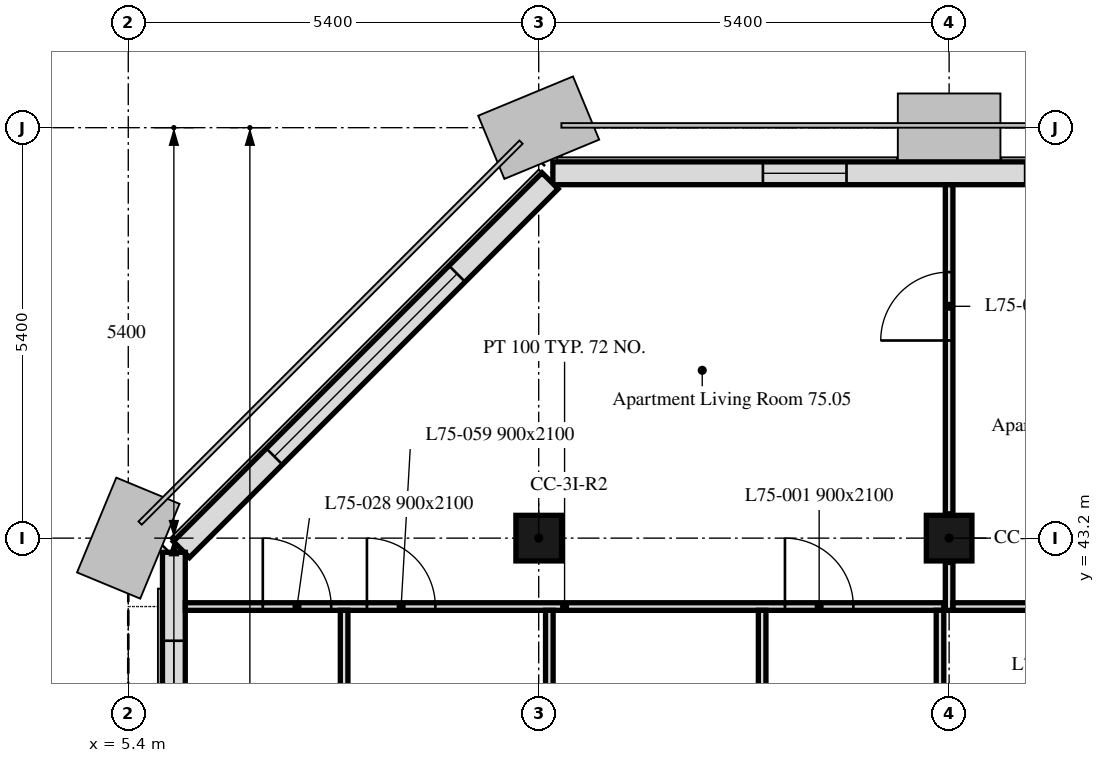
"""IFC4 building model, lengths in metres.
Left out: names, types, materials, properties, quantities, classifications, styles, units other than length and angle.
Written with IfcOpenShell. Run it as: python <this file> out.ifc"""

import sys

from ifc_helpers import new_model, si_unit, direction, frame, frame_2d, origin, origin_2d, place, context, subcontext, project, spatial, rectangle, extrude, element, fill, save


model = new_model("IFC4")
c1 = context("Model", 3, precision=1e-05, world=origin(), true_north=direction((0.0, 1.0)))
c2 = subcontext(c1, "Body", "Model", "MODEL_VIEW")
j1 = project(units=[si_unit("LENGTHUNIT", "METRE"), si_unit("PLANEANGLEUNIT", "RADIAN")], contexts=[c1])
p1 = place(None, origin())
s1 = spatial("IfcSite", under=j1, at=p1, CompositionType="ELEMENT")
p2 = place(p1, origin())
s2 = spatial("IfcBuilding", under=s1, at=p2, CompositionType="ELEMENT")
p3 = place(p2, frame((0.0, 0.0, 301.6)))
s3 = spatial("IfcBuildingStorey", under=s2, at=p3, CompositionType="ELEMENT", Elevation=301.6)
for number, where, z_axis, x_axis in (
    (1, (10.8, 43.2, 0.0), (0.0, 0.0, 1.0), (1.0, 0.0, 0.0)),
    (2, (16.2, 43.2, 0.0), (0.0, 0.0, 1.0), (1.0, 0.0, 0.0)),
):
    element("IfcColumn", number, at=place(p3, frame(where, z_axis=z_axis, x_axis=x_axis)), inside=s3, PredefinedType="COLUMN", context=c2, shape_type="SweptSolid", body=[
        extrude(rectangle(XDim=0.6, YDim=0.6, at=origin_2d()), origin(), (0.0, 0.0, 1.0), 3.0),
    ])
p4 = place(p3, frame((43.014, 48.0, 0.0), z_axis=(0.0, 0.0, 1.0), x_axis=(-1.0, 0.0, 0.0)))
e3 = element("IfcWall", 3, at=p4, inside=s3, PredefinedType="SOLIDWALL", context=c2, shape_type="SweptSolid", body=[
    extrude(rectangle(XDim=32.027, YDim=0.3, at=frame_2d((16.014, 0.0))), origin(), (0.0, 0.0, 1.0), 3.0),
])
p5 = place(p4, frame((0.814, 0.0, 0.9)))
e4 = element("IfcOpeningElement", 4, at=p5, cuts=e3, PredefinedType="OPENING", context=c2, shape_type="SweptSolid", body=[
    extrude(rectangle(XDim=3.4, YDim=1.7, at=frame_2d((1.7, 0.85))), frame((0.0, 0.16, 0.0), z_axis=(0.0, -1.0, 0.0), x_axis=(1.0, 0.0, 0.0)), (0.0, 0.0, 1.0), 0.32),
])
p6 = place(p4, frame((6.564, 0.0, 0.9)))
e5 = element("IfcOpeningElement", 5, at=p6, cuts=e3, PredefinedType="OPENING", context=c2, shape_type="SweptSolid", body=[
    extrude(rectangle(XDim=1.1, YDim=1.7, at=frame_2d((0.55, 0.85))), frame((0.0, 0.16, 0.0), z_axis=(0.0, -1.0, 0.0), x_axis=(1.0, 0.0, 0.0)), (0.0, 0.0, 1.0), 0.32),
])
p7 = place(p4, frame((11.614, 0.0, 0.9)))
e6 = element("IfcOpeningElement", 6, at=p7, cuts=e3, PredefinedType="OPENING", context=c2, shape_type="SweptSolid", body=[
    extrude(rectangle(XDim=3.4, YDim=1.7, at=frame_2d((1.7, 0.85))), frame((0.0, 0.16, 0.0), z_axis=(0.0, -1.0, 0.0), x_axis=(1.0, 0.0, 0.0)), (0.0, 0.0, 1.0), 0.32),
])
p8 = place(p4, frame((17.364, 0.0, 0.9)))
e7 = element("IfcOpeningElement", 7, at=p8, cuts=e3, PredefinedType="OPENING", context=c2, shape_type="SweptSolid", body=[
    extrude(rectangle(XDim=1.1, YDim=1.7, at=frame_2d((0.55, 0.85))), frame((0.0, 0.16, 0.0), z_axis=(0.0, -1.0, 0.0), x_axis=(1.0, 0.0, 0.0)), (0.0, 0.0, 1.0), 0.32),
])
p9 = place(p4, frame((22.414, 0.0, 0.9)))
e8 = element("IfcOpeningElement", 8, at=p9, cuts=e3, PredefinedType="OPENING", context=c2, shape_type="SweptSolid", body=[
    extrude(rectangle(XDim=3.4, YDim=1.7, at=frame_2d((1.7, 0.85))), frame((0.0, 0.16, 0.0), z_axis=(0.0, -1.0, 0.0), x_axis=(1.0, 0.0, 0.0)), (0.0, 0.0, 1.0), 0.32),
])
p10 = place(p4, frame((28.164, 0.0, 0.9)))
e9 = element("IfcOpeningElement", 9, at=p10, cuts=e3, PredefinedType="OPENING", context=c2, shape_type="SweptSolid", body=[
    extrude(rectangle(XDim=1.1, YDim=1.7, at=frame_2d((0.55, 0.85))), frame((0.0, 0.16, 0.0), z_axis=(0.0, -1.0, 0.0), x_axis=(1.0, 0.0, 0.0)), (0.0, 0.0, 1.0), 0.32),
])
p11 = place(p3, frame((10.949, 47.901, 0.0), z_axis=(0.0, 0.0, 1.0), x_axis=(-0.707106781187, -0.707106781187, 0.0)))
e10 = element("IfcWall", 10, at=p11, inside=s3, PredefinedType="SOLIDWALL", context=c2, shape_type="SweptSolid", body=[
    extrude(rectangle(XDim=6.86, YDim=0.3, at=frame_2d((3.43, 0.0))), origin(), (0.0, 0.0, 1.0), 3.0),
])
p12 = place(p11, frame((1.73, 0.0, 0.9)))
e11 = element("IfcOpeningElement", 11, at=p12, cuts=e10, PredefinedType="OPENING", context=c2, shape_type="SweptSolid", body=[
    extrude(rectangle(XDim=3.4, YDim=1.7, at=frame_2d((1.7, 0.85))), frame((0.0, 0.16, 0.0), z_axis=(0.0, -1.0, 0.0), x_axis=(1.0, 0.0, 0.0)), (0.0, 0.0, 1.0), 0.32),
])
p13 = place(p3, frame((6.0, 43.014, 0.0), z_axis=(0.0, 0.0, 1.0), x_axis=(0.0, -1.0, 0.0)))
e12 = element("IfcWall", 12, at=p13, inside=s3, PredefinedType="SOLIDWALL", context=c2, shape_type="SweptSolid", body=[
    extrude(rectangle(XDim=10.614, YDim=0.3, at=frame_2d((5.307, 0.0))), origin(), (0.0, 0.0, 1.0), 3.0),
])
p14 = place(p13, frame((1.164, 0.0, 0.9)))
e13 = element("IfcOpeningElement", 13, at=p14, cuts=e12, PredefinedType="OPENING", context=c2, shape_type="SweptSolid", body=[
    extrude(rectangle(XDim=1.1, YDim=1.7, at=frame_2d((0.55, 0.85))), frame((0.0, 0.16, 0.0), z_axis=(0.0, -1.0, 0.0), x_axis=(1.0, 0.0, 0.0)), (0.0, 0.0, 1.0), 0.32),
])
p15 = place(p13, frame((2.764, 0.0, 0.9)))
e14 = element("IfcOpeningElement", 14, at=p15, cuts=e12, PredefinedType="OPENING", context=c2, shape_type="SweptSolid", body=[
    extrude(rectangle(XDim=1.1, YDim=1.7, at=frame_2d((0.55, 0.85))), frame((0.0, 0.16, 0.0), z_axis=(0.0, -1.0, 0.0), x_axis=(1.0, 0.0, 0.0)), (0.0, 0.0, 1.0), 0.32),
])
p16 = place(p13, frame((6.564, 0.0, 0.9)))
e15 = element("IfcOpeningElement", 15, at=p16, cuts=e12, PredefinedType="OPENING", context=c2, shape_type="SweptSolid", body=[
    extrude(rectangle(XDim=1.1, YDim=1.7, at=frame_2d((0.55, 0.85))), frame((0.0, 0.16, 0.0), z_axis=(0.0, -1.0, 0.0), x_axis=(1.0, 0.0, 0.0)), (0.0, 0.0, 1.0), 0.32),
])
p17 = place(p13, frame((7.989, 0.0, 0.9)))
e16 = element("IfcOpeningElement", 16, at=p17, cuts=e12, PredefinedType="OPENING", context=c2, shape_type="SweptSolid", body=[
    extrude(rectangle(XDim=0.65, YDim=1.7, at=frame_2d((0.325, 0.85))), frame((0.0, 0.16, 0.0), z_axis=(0.0, -1.0, 0.0), x_axis=(1.0, 0.0, 0.0)), (0.0, 0.0, 1.0), 0.32),
])
p18 = place(p3, frame((6.151, 42.3, 0.0), z_axis=(0.0, 0.0, 1.0), x_axis=(1.0, 0.0, 0.0)))
e17 = element("IfcWall", 17, at=p18, inside=s3, PredefinedType="PARTITIONING", context=c2, shape_type="SweptSolid", body=[
    extrude(rectangle(XDim=9.979, YDim=0.1, at=frame_2d((4.99, 0.0))), origin(), (0.0, 0.0, 1.0), 3.0),
])
p19 = place(p18, frame((7.889, 0.0, 0.0)))
e18 = element("IfcOpeningElement", 18, at=p19, cuts=e17, PredefinedType="OPENING", context=c2, shape_type="SweptSolid", body=[
    extrude(rectangle(XDim=0.9, YDim=2.1, at=frame_2d((0.45, 1.05))), frame((0.0, 0.05, 0.0), z_axis=(0.0, -1.0, 0.0), x_axis=(1.0, 0.0, 0.0)), (0.0, 0.0, 1.0), 0.1),
])
p20 = place(p18, frame((1.019, 0.0, 0.0)))
e19 = element("IfcOpeningElement", 19, at=p20, cuts=e17, PredefinedType="OPENING", context=c2, shape_type="SweptSolid", body=[
    extrude(rectangle(XDim=0.9, YDim=2.1, at=frame_2d((0.45, 1.05))), frame((0.0, 0.05, 0.0), z_axis=(0.0, -1.0, 0.0), x_axis=(1.0, 0.0, 0.0)), (0.0, 0.0, 1.0), 0.1),
])
p21 = place(p18, frame((2.389, 0.0, 0.0)))
e20 = element("IfcOpeningElement", 20, at=p21, cuts=e17, PredefinedType="OPENING", context=c2, shape_type="SweptSolid", body=[
    extrude(rectangle(XDim=0.9, YDim=2.1, at=frame_2d((0.45, 1.05))), frame((0.0, 0.05, 0.0), z_axis=(0.0, -1.0, 0.0), x_axis=(1.0, 0.0, 0.0)), (0.0, 0.0, 1.0), 0.1),
])
p22 = place(p3, frame((16.2, 42.25, 0.0), z_axis=(0.0, 0.0, 1.0), x_axis=(0.0, 1.0, 0.0)))
e21 = element("IfcWall", 21, at=p22, inside=s3, PredefinedType="PARTITIONING", context=c2, shape_type="SweptSolid", body=[
    extrude(rectangle(XDim=0.63, YDim=0.1, at=frame_2d((0.315, 0.0))), origin(), (0.0, 0.0, 1.0), 2.4),
])
p23 = place(p3, frame((16.2, 43.52, 0.0), z_axis=(0.0, 0.0, 1.0), x_axis=(0.0, 1.0, 0.0)))
e22 = element("IfcWall", 22, at=p23, inside=s3, PredefinedType="PARTITIONING", context=c2, shape_type="SweptSolid", body=[
    extrude(rectangle(XDim=4.329, YDim=0.1, at=frame_2d((2.165, 0.0))), origin(), (0.0, 0.0, 1.0), 2.4),
])
p24 = place(p23, frame((2.28, 0.0, 0.0)))
e23 = element("IfcOpeningElement", 23, at=p24, cuts=e22, PredefinedType="OPENING", context=c2, shape_type="SweptSolid", body=[
    extrude(rectangle(XDim=0.9, YDim=2.1, at=frame_2d((0.45, 1.05))), frame((0.0, 0.05, 0.0), z_axis=(0.0, -1.0, 0.0), x_axis=(1.0, 0.0, 0.0)), (0.0, 0.0, 1.0), 0.1),
])
p25 = place(p3, frame((16.25, 42.3, 0.0), z_axis=(0.0, 0.0, 1.0), x_axis=(1.0, 0.0, 0.0)))
e24 = element("IfcWall", 24, at=p25, inside=s3, PredefinedType="PARTITIONING", context=c2, shape_type="SweptSolid", body=[
    extrude(rectangle(XDim=5.275, YDim=0.1, at=frame_2d((2.637, 0.0))), origin(), (0.0, 0.0, 1.0), 3.0),
])
p26 = place(p25, frame((2.08, 0.0, 0.0)))
e25 = element("IfcOpeningElement", 25, at=p26, cuts=e24, PredefinedType="OPENING", context=c2, shape_type="SweptSolid", body=[
    extrude(rectangle(XDim=0.9, YDim=2.1, at=frame_2d((0.45, 1.05))), frame((0.0, 0.05, 0.0), z_axis=(0.0, -1.0, 0.0), x_axis=(1.0, 0.0, 0.0)), (0.0, 0.0, 1.0), 0.1),
])
p27 = place(p25, frame((3.45, 0.0, 0.0)))
e26 = element("IfcOpeningElement", 26, at=p27, cuts=e24, PredefinedType="OPENING", context=c2, shape_type="SweptSolid", body=[
    extrude(rectangle(XDim=0.9, YDim=2.1, at=frame_2d((0.45, 1.05))), frame((0.0, 0.05, 0.0), z_axis=(0.0, -1.0, 0.0), x_axis=(1.0, 0.0, 0.0)), (0.0, 0.0, 1.0), 0.1),
])
p28 = place(p3, frame((8.24, 34.275, 0.0), z_axis=(0.0, 0.0, 1.0), x_axis=(0.0, 1.0, 0.0)))
e27 = element("IfcWall", 27, at=p28, inside=s3, PredefinedType="PARTITIONING", context=c2, shape_type="SweptSolid", body=[
    extrude(rectangle(XDim=7.975, YDim=0.1, at=frame_2d((3.988, 0.0))), origin(), (0.0, 0.0, 1.0), 3.0),
])
p29 = place(p28, frame((0.825, 0.0, 0.0)))
e28 = element("IfcOpeningElement", 28, at=p29, cuts=e27, PredefinedType="OPENING", context=c2, shape_type="SweptSolid", body=[
    extrude(rectangle(XDim=0.9, YDim=2.1, at=frame_2d((0.45, 1.05))), frame((0.0, 0.05, 0.0), z_axis=(0.0, -1.0, 0.0), x_axis=(1.0, 0.0, 0.0)), (0.0, 0.0, 1.0), 0.1),
])
p30 = place(p28, frame((4.875, 0.0, 0.0)))
e29 = element("IfcOpeningElement", 29, at=p30, cuts=e27, PredefinedType="OPENING", context=c2, shape_type="SweptSolid", body=[
    extrude(rectangle(XDim=0.9, YDim=2.1, at=frame_2d((0.45, 1.05))), frame((0.0, 0.05, 0.0), z_axis=(0.0, -1.0, 0.0), x_axis=(1.0, 0.0, 0.0)), (0.0, 0.0, 1.0), 0.1),
])
p31 = place(p3, frame((10.94, 38.12, 0.0), z_axis=(0.0, 0.0, 1.0), x_axis=(0.0, 1.0, 0.0)))
e30 = element("IfcWall", 30, at=p31, inside=s3, PredefinedType="PARTITIONING", context=c2, shape_type="SweptSolid", body=[
    extrude(rectangle(XDim=4.13, YDim=0.1, at=frame_2d((2.065, 0.0))), origin(), (0.0, 0.0, 1.0), 3.0),
])
p32 = place(p31, frame((2.005, 0.0, 0.0)))
e31 = element("IfcOpeningElement", 31, at=p32, cuts=e30, PredefinedType="OPENING", context=c2, shape_type="SweptSolid", body=[
    extrude(rectangle(XDim=0.9, YDim=2.1, at=frame_2d((0.45, 1.05))), frame((0.0, 0.05, 0.0), z_axis=(0.0, -1.0, 0.0), x_axis=(1.0, 0.0, 0.0)), (0.0, 0.0, 1.0), 0.1),
])
p33 = place(p3, frame((13.74, 34.275, 0.0), z_axis=(0.0, 0.0, 1.0), x_axis=(0.0, 1.0, 0.0)))
e32 = element("IfcWall", 32, at=p33, inside=s3, PredefinedType="PARTITIONING", context=c2, shape_type="SweptSolid", body=[
    extrude(rectangle(XDim=7.975, YDim=0.1, at=frame_2d((3.988, 0.0))), origin(), (0.0, 0.0, 1.0), 3.0),
])
p34 = place(p3, frame((16.08, 38.12, 0.0), z_axis=(0.0, 0.0, 1.0), x_axis=(0.0, 1.0, 0.0)))
e33 = element("IfcWall", 33, at=p34, inside=s3, PredefinedType="PARTITIONING", context=c2, shape_type="SweptSolid", body=[
    extrude(rectangle(XDim=4.13, YDim=0.1, at=frame_2d((2.065, 0.0))), origin(), (0.0, 0.0, 1.0), 2.4),
])
p35 = place(p10, origin())
e34 = element("IfcWindow", 34, at=p35, inside=s3, PartitioningType="SINGLE_PANEL", PredefinedType="WINDOW", context=c2, shape_type="SweptSolid", body=[
    extrude(rectangle(XDim=1.1, YDim=1.7, at=frame_2d((0.55, 0.85))), frame((0.0, 0.03, 0.0), z_axis=(0.0, -1.0, 0.0), x_axis=(1.0, 0.0, 0.0)), (0.0, 0.0, 1.0), 0.06),
])
fill(e9, e34)
p36 = place(p12, origin())
e35 = element("IfcWindow", 35, at=p36, inside=s3, PartitioningType="SINGLE_PANEL", PredefinedType="WINDOW", context=c2, shape_type="SweptSolid", body=[
    extrude(rectangle(XDim=3.4, YDim=1.7, at=frame_2d((1.7, 0.85))), frame((0.0, 0.03, 0.0), z_axis=(0.0, -1.0, 0.0), x_axis=(1.0, 0.0, 0.0)), (0.0, 0.0, 1.0), 0.06),
])
fill(e11, e35)
p37 = place(p14, origin())
e36 = element("IfcWindow", 36, at=p37, inside=s3, PartitioningType="SINGLE_PANEL", PredefinedType="WINDOW", context=c2, shape_type="SweptSolid", body=[
    extrude(rectangle(XDim=1.1, YDim=1.7, at=frame_2d((0.55, 0.85))), frame((0.0, 0.03, 0.0), z_axis=(0.0, -1.0, 0.0), x_axis=(1.0, 0.0, 0.0)), (0.0, 0.0, 1.0), 0.06),
])
fill(e13, e36)
p38 = place(p19, origin())
e37 = element("IfcDoor", 37, at=p38, inside=s3, OperationType="SINGLE_SWING_RIGHT", PredefinedType="DOOR", context=c2, shape_type="SweptSolid", body=[
    extrude(rectangle(XDim=0.9, YDim=2.1, at=frame_2d((0.45, 1.05))), frame((0.0, 0.025, 0.0), z_axis=(0.0, -1.0, 0.0), x_axis=(1.0, 0.0, 0.0)), (0.0, 0.0, 1.0), 0.05),
])
fill(e18, e37)
p39 = place(p20, origin())
e38 = element("IfcDoor", 38, at=p39, inside=s3, OperationType="SINGLE_SWING_LEFT", PredefinedType="DOOR", context=c2, shape_type="SweptSolid", body=[
    extrude(rectangle(XDim=0.9, YDim=2.1, at=frame_2d((0.45, 1.05))), frame((0.0, 0.025, 0.0), z_axis=(0.0, -1.0, 0.0), x_axis=(1.0, 0.0, 0.0)), (0.0, 0.0, 1.0), 0.05),
])
fill(e19, e38)
p40 = place(p24, origin())
e39 = element("IfcDoor", 39, at=p40, inside=s3, OperationType="SINGLE_SWING_LEFT", PredefinedType="DOOR", context=c2, shape_type="SweptSolid", body=[
    extrude(rectangle(XDim=0.9, YDim=2.1, at=frame_2d((0.45, 1.05))), frame((0.0, 0.025, 0.0), z_axis=(0.0, -1.0, 0.0), x_axis=(1.0, 0.0, 0.0)), (0.0, 0.0, 1.0), 0.05),
])
fill(e23, e39)
p41 = place(p21, origin())
e40 = element("IfcDoor", 40, at=p41, inside=s3, OperationType="SINGLE_SWING_RIGHT", PredefinedType="DOOR", context=c2, shape_type="SweptSolid", body=[
    extrude(rectangle(XDim=0.9, YDim=2.1, at=frame_2d((0.45, 1.05))), frame((0.0, 0.025, 0.0), z_axis=(0.0, -1.0, 0.0), x_axis=(1.0, 0.0, 0.0)), (0.0, 0.0, 1.0), 0.05),
])
fill(e20, e40)
save(model, sys.argv[1])
